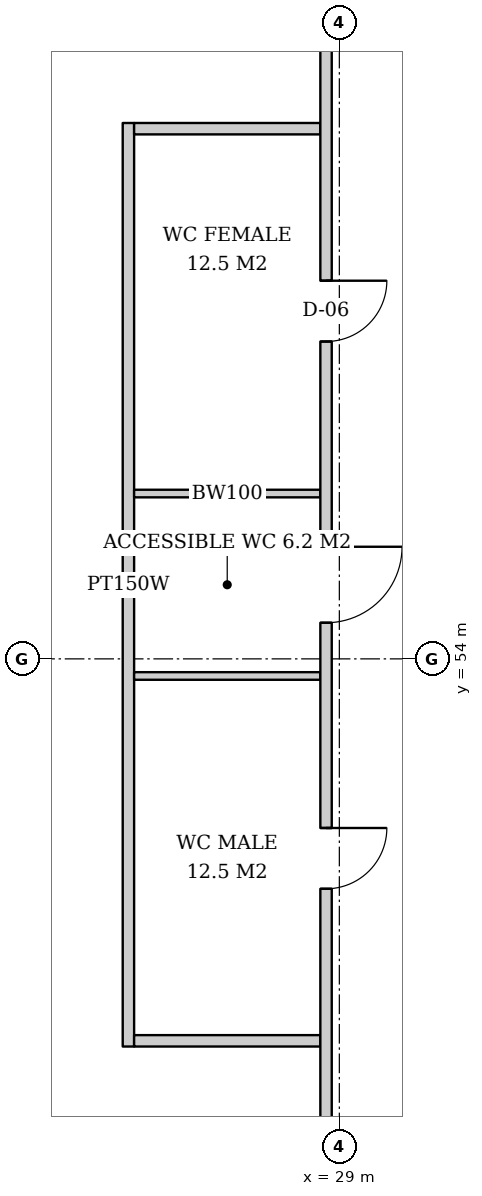
"""IFC4 building model, lengths in metres.
Left out: names, types, materials, properties, quantities, classifications, styles, units other than length and angle.
Written with IfcOpenShell. Run it as: python <this file> out.ifc"""

import sys

from ifc_helpers import new_model, si_unit, direction, frame, frame_2d, origin, place, context, subcontext, project, spatial, rectangle, extrude, element, fill, save


model = new_model("IFC4")
c1 = context("Model", 3, precision=1e-05, world=origin(), true_north=direction((0.0, 1.0)))
c2 = subcontext(c1, "Body", "Model", "MODEL_VIEW")
j1 = project(units=[si_unit("LENGTHUNIT", "METRE"), si_unit("PLANEANGLEUNIT", "RADIAN")], contexts=[c1])
p1 = place(None, origin())
s1 = spatial("IfcSite", under=j1, at=p1, CompositionType="ELEMENT")
p2 = place(p1, origin())
s2 = spatial("IfcBuilding", under=s1, at=p2, CompositionType="ELEMENT")
p3 = place(p2, frame((0.0, 0.0, 47.6)))
s3 = spatial("IfcBuildingStorey", under=s2, at=p3, CompositionType="ELEMENT", Elevation=47.6)
p4 = place(p3, frame((26.225, 61.05, 0.0), z_axis=(0.0, 0.0, 1.0), x_axis=(0.0, -1.0, 0.0)))
e1 = element("IfcWall", 1, at=p4, inside=s3, PredefinedType="PARTITIONING", context=c2, shape_type="SweptSolid", body=[
    extrude(rectangle(XDim=12.15, YDim=0.15, at=frame_2d((6.075, 0.0))), origin(), (0.0, 0.0, 1.0), 2.612),
])
p5 = place(p3, frame((28.75, 60.975, 0.0), z_axis=(0.0, 0.0, 1.0), x_axis=(-1.0, 0.0, 0.0)))
e2 = element("IfcWall", 2, at=p5, inside=s3, PredefinedType="PARTITIONING", context=c2, shape_type="SweptSolid", body=[
    extrude(rectangle(XDim=2.45, YDim=0.15, at=frame_2d((1.225, 0.0))), origin(), (0.0, 0.0, 1.0), 3.62),
])
for number, where, z_axis, x_axis in (
    (3, (28.75, 56.175, 0.0), (0.0, 0.0, 1.0), (-1.0, 0.0, 0.0)),
    (4, (28.75, 53.775, 0.0), (0.0, 0.0, 1.0), (-1.0, 0.0, 0.0)),
):
    element("IfcWall", number, at=place(p3, frame(where, z_axis=z_axis, x_axis=x_axis)), inside=s3, PredefinedType="SOLIDWALL", context=c2, shape_type="SweptSolid", body=[
        extrude(rectangle(XDim=2.45, YDim=0.1, at=frame_2d((1.225, 0.0))), origin(), (0.0, 0.0, 1.0), 3.62),
    ])
p6 = place(p3, frame((28.75, 48.975, 0.0), z_axis=(0.0, 0.0, 1.0), x_axis=(-1.0, 0.0, 0.0)))
e5 = element("IfcWall", 5, at=p6, inside=s3, PredefinedType="PARTITIONING", context=c2, shape_type="SweptSolid", body=[
    extrude(rectangle(XDim=2.45, YDim=0.15, at=frame_2d((1.225, 0.0))), origin(), (0.0, 0.0, 1.0), 3.62),
])
p7 = place(p3, frame((28.825, 62.25, 0.0), z_axis=(0.0, 0.0, 1.0), x_axis=(0.0, -1.0, 0.0)))
e6 = element("IfcWall", 6, at=p7, inside=s3, PredefinedType="PARTITIONING", context=c2, shape_type="SweptSolid", body=[
    extrude(rectangle(XDim=32.35, YDim=0.15, at=frame_2d((16.175, 0.0))), origin(), (0.0, 0.0, 1.0), 2.612),
])
p8 = place(p7, frame((3.275, 0.0, 0.0)))
e7 = element("IfcOpeningElement", 7, at=p8, cuts=e6, PredefinedType="OPENING", context=c2, shape_type="SweptSolid", body=[
    extrude(rectangle(XDim=0.8, YDim=2.1, at=frame_2d((0.4, 1.05))), frame((0.0, 0.085, 0.0), z_axis=(0.0, -1.0, 0.0), x_axis=(1.0, 0.0, 0.0)), (0.0, 0.0, 1.0), 0.17),
])
p9 = place(p7, frame((6.775, 0.0, 0.0)))
e8 = element("IfcOpeningElement", 8, at=p9, cuts=e6, PredefinedType="OPENING", context=c2, shape_type="SweptSolid", body=[
    extrude(rectangle(XDim=1.0, YDim=2.1, at=frame_2d((0.5, 1.05))), frame((0.0, 0.085, 0.0), z_axis=(0.0, -1.0, 0.0), x_axis=(1.0, 0.0, 0.0)), (0.0, 0.0, 1.0), 0.17),
])
p10 = place(p7, frame((10.475, 0.0, 0.0)))
e9 = element("IfcOpeningElement", 9, at=p10, cuts=e6, PredefinedType="OPENING", context=c2, shape_type="SweptSolid", body=[
    extrude(rectangle(XDim=0.8, YDim=2.1, at=frame_2d((0.4, 1.05))), frame((0.0, 0.085, 0.0), z_axis=(0.0, -1.0, 0.0), x_axis=(1.0, 0.0, 0.0)), (0.0, 0.0, 1.0), 0.17),
])
p11 = place(p8, origin())
e10 = element("IfcDoor", 10, at=p11, inside=s3, OperationType="SINGLE_SWING_LEFT", PredefinedType="DOOR", context=c2, shape_type="SweptSolid", body=[
    extrude(rectangle(XDim=0.8, YDim=2.1, at=frame_2d((0.4, 1.05))), frame((0.0, 0.025, 0.0), z_axis=(0.0, -1.0, 0.0), x_axis=(1.0, 0.0, 0.0)), (0.0, 0.0, 1.0), 0.05),
])
fill(e7, e10)
p12 = place(p9, origin())
e11 = element("IfcDoor", 11, at=p12, inside=s3, OperationType="SINGLE_SWING_LEFT", PredefinedType="DOOR", context=c2, shape_type="SweptSolid", body=[
    extrude(rectangle(XDim=1.0, YDim=2.1, at=frame_2d((0.5, 1.05))), frame((0.0, 0.025, 0.0), z_axis=(0.0, -1.0, 0.0), x_axis=(1.0, 0.0, 0.0)), (0.0, 0.0, 1.0), 0.05),
])
fill(e8, e11)
p13 = place(p10, origin())
e12 = element("IfcDoor", 12, at=p13, inside=s3, OperationType="SINGLE_SWING_LEFT", PredefinedType="DOOR", context=c2, shape_type="SweptSolid", body=[
    extrude(rectangle(XDim=0.8, YDim=2.1, at=frame_2d((0.4, 1.05))), frame((0.0, 0.025, 0.0), z_axis=(0.0, -1.0, 0.0), x_axis=(1.0, 0.0, 0.0)), (0.0, 0.0, 1.0), 0.05),
])
fill(e9, e12)
save(model, sys.argv[1])
